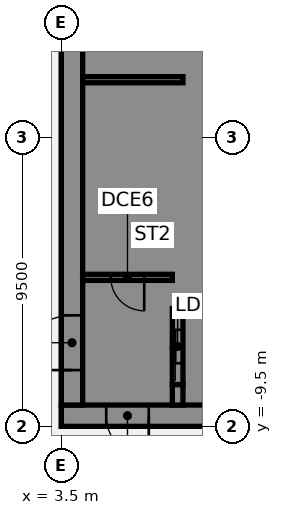
"""IFC4 building model, lengths in metres.
Left out: names, types, materials, properties, quantities, classifications, styles, units other than length and angle.
Written with IfcOpenShell. Run it as: python <this file> out.ifc"""

import sys

from ifc_helpers import new_model, si_unit, direction, frame, frame_2d, origin, place, context, subcontext, project, spatial, polyline, rectangle, outline, extrude, element, fill, save


model = new_model("IFC4")
c1 = context("Model", 3, precision=1e-05, world=origin(), true_north=direction((0.0, 1.0)))
c2 = subcontext(c1, "Body", "Model", "MODEL_VIEW")
j1 = project(units=[si_unit("LENGTHUNIT", "METRE"), si_unit("PLANEANGLEUNIT", "RADIAN")], contexts=[c1])
p1 = place(None, origin())
s1 = spatial("IfcSite", under=j1, at=p1, CompositionType="ELEMENT")
p2 = place(p1, origin())
s2 = spatial("IfcBuilding", under=s1, at=p2, CompositionType="ELEMENT")
p3 = place(p2, frame((0.0, 0.0, 71.5)))
s3 = spatial("IfcBuildingStorey", under=s2, at=p3, CompositionType="ELEMENT", Elevation=71.5)
p4 = place(p3, frame((16.5, -9.15, 0.0), z_axis=(0.0, 0.0, 1.0), x_axis=(-1.0, 0.0, 0.0)))
e1 = element("IfcWall", 1, at=p4, inside=s3, PredefinedType="SHEAR", context=c2, shape_type="SweptSolid", body=[
    extrude(rectangle(XDim=13.0, YDim=0.7, at=frame_2d((6.5, 0.0))), origin(), (0.0, 0.0, 1.0), 3.61),
])
p5 = place(p4, frame((4.15, 0.0, 0.0)))
e2 = element("IfcOpeningElement", 2, at=p5, cuts=e1, PredefinedType="OPENING", context=c2, shape_type="SweptSolid", body=[
    extrude(rectangle(XDim=1.4, YDim=2.1, at=frame_2d((0.7, 1.05))), frame((0.0, 0.36, 0.0), z_axis=(0.0, -1.0, 0.0), x_axis=(1.0, 0.0, 0.0)), (0.0, 0.0, 1.0), 0.72),
])
p6 = place(p4, frame((10.125, 0.0, 0.0)))
e3 = element("IfcOpeningElement", 3, at=p6, cuts=e1, PredefinedType="OPENING", context=c2, shape_type="SweptSolid", body=[
    extrude(rectangle(XDim=1.4, YDim=2.1, at=frame_2d((0.7, 1.05))), frame((0.0, 0.36, 0.0), z_axis=(0.0, -1.0, 0.0), x_axis=(1.0, 0.0, 0.0)), (0.0, 0.0, 1.0), 0.72),
])
p7 = place(p3, origin())
e4 = element("IfcWall", 4, at=p7, inside=s3, PredefinedType="SHEAR", context=c2, shape_type="SweptSolid", body=[
    extrude(outline(polyline([(9.8, -5.375), (7.5, -5.375), (7.5, -2.875), (9.8, -2.875), (9.8, -2.625), (7.5, -2.625), (7.5, -0.125), (9.8, -0.125), (9.8, 0.125), (7.5, 0.125), (7.5, 2.625), (9.8, 2.625), (9.8, 2.875), (7.5, 2.875), (7.5, 5.375), (9.8, 5.375), (9.8, 5.625), (7.5, 5.625), (7.5, 8.125), (9.8, 8.125), (9.8, 8.8), (7.5, 8.8), (7.15, 8.8), (7.15, -5.625), (7.5, -5.625), (9.8, -5.625), (9.8, -5.375)])), origin(), (0.0, 0.0, 1.0), 3.61),
])
p8 = place(p3, origin())
e5 = element("IfcWall", 5, at=p8, inside=s3, PredefinedType="SHEAR", context=c2, shape_type="SweptSolid", body=[
    extrude(outline(polyline([(7.5, -8.125), (7.5, -8.8), (9.8, -8.8), (9.8, -8.125), (9.8, -5.625), (9.55, -5.625), (9.55, -8.125), (7.5, -8.125)])), origin(), (0.0, 0.0, 1.0), 3.61),
])
p9 = place(p3, frame((7.325, -8.8, 0.0), z_axis=(0.0, 0.0, 1.0), x_axis=(0.0, 1.0, 0.0)))
e6 = element("IfcWall", 6, at=p9, inside=s3, PredefinedType="SHEAR", context=c2, shape_type="SweptSolid", body=[
    extrude(rectangle(XDim=0.675, YDim=0.35, at=frame_2d((0.337, 0.0))), origin(), (0.0, 0.0, 1.0), 3.61),
])
p10 = place(p3, frame((7.5, 1.9, 0.0), z_axis=(0.0, 0.0, 1.0), x_axis=(-1.0, 0.0, 0.0)))
e7 = element("IfcWall", 7, at=p10, inside=s3, PredefinedType="SHEAR", context=c2, shape_type="SweptSolid", body=[
    extrude(rectangle(XDim=3.3, YDim=0.2, at=frame_2d((1.65, 0.0))), origin(), (0.0, 0.0, 1.0), 3.61),
])
p11 = place(p3, frame((7.325, -8.125, 0.0), z_axis=(0.0, 0.0, 1.0), x_axis=(0.0, 1.0, 0.0)))
e8 = element("IfcWall", 8, at=p11, inside=s3, PredefinedType="SHEAR", context=c2, shape_type="SweptSolid", body=[
    extrude(rectangle(XDim=2.5, YDim=0.35, at=frame_2d((1.25, 0.0))), origin(), (0.0, 0.0, 1.0), 3.61),
])
p12 = place(p11, frame((0.7, 0.0, 0.0)))
e9 = element("IfcOpeningElement", 9, at=p12, cuts=e8, PredefinedType="OPENING", context=c2, shape_type="SweptSolid", body=[
    extrude(rectangle(XDim=1.1, YDim=2.1, at=frame_2d((0.55, 1.05))), frame((0.0, 0.185, 0.0), z_axis=(0.0, -1.0, 0.0), x_axis=(1.0, 0.0, 0.0)), (0.0, 0.0, 1.0), 0.37),
])
p13 = place(p3, frame((3.85, -8.8, 0.0), z_axis=(0.0, 0.0, 1.0), x_axis=(0.0, 1.0, 0.0)))
e10 = element("IfcWall", 10, at=p13, inside=s3, PredefinedType="SHEAR", context=c2, shape_type="SweptSolid", body=[
    extrude(rectangle(XDim=17.6, YDim=0.7, at=frame_2d((8.8, 0.0))), origin(), (0.0, 0.0, 1.0), 3.61),
])
p14 = place(p13, frame((1.15, 0.0, 0.0)))
e11 = element("IfcOpeningElement", 11, at=p14, cuts=e10, PredefinedType="OPENING", context=c2, shape_type="SweptSolid", body=[
    extrude(rectangle(XDim=1.8, YDim=2.1, at=frame_2d((0.9, 1.05))), frame((0.0, 0.36, 0.0), z_axis=(0.0, -1.0, 0.0), x_axis=(1.0, 0.0, 0.0)), (0.0, 0.0, 1.0), 0.72),
])
p15 = place(p13, frame((13.7, 0.0, 0.0)))
e12 = element("IfcOpeningElement", 12, at=p15, cuts=e10, PredefinedType="OPENING", context=c2, shape_type="SweptSolid", body=[
    extrude(rectangle(XDim=1.0, YDim=2.1, at=frame_2d((0.5, 1.05))), frame((0.0, 0.36, 0.0), z_axis=(0.0, -1.0, 0.0), x_axis=(1.0, 0.0, 0.0)), (0.0, 0.0, 1.0), 0.72),
])
p16 = place(p3, frame((7.15, -4.6, 0.0), z_axis=(0.0, 0.0, 1.0), x_axis=(-1.0, 0.0, 0.0)))
e13 = element("IfcWall", 13, at=p16, inside=s3, PredefinedType="SHEAR", context=c2, shape_type="SweptSolid", body=[
    extrude(rectangle(XDim=2.95, YDim=0.2, at=frame_2d((1.475, 0.0))), origin(), (0.0, 0.0, 1.0), 3.61),
])
p17 = place(p16, frame((0.925, 0.0, 0.0)))
e14 = element("IfcOpeningElement", 14, at=p17, cuts=e13, PredefinedType="OPENING", context=c2, shape_type="SweptSolid", body=[
    extrude(rectangle(XDim=1.1, YDim=2.1, at=frame_2d((0.55, 1.05))), frame((0.0, 0.11, 0.0), z_axis=(0.0, -1.0, 0.0), x_axis=(1.0, 0.0, 0.0)), (0.0, 0.0, 1.0), 0.22),
])
p18 = place(p6, origin())
e15 = element("IfcDoor", 15, at=p18, inside=s3, OperationType="SINGLE_SWING_LEFT", PredefinedType="DOOR", context=c2, shape_type="SweptSolid", body=[
    extrude(rectangle(XDim=1.4, YDim=2.1, at=frame_2d((0.7, 1.05))), frame((0.0, 0.025, 0.0), z_axis=(0.0, -1.0, 0.0), x_axis=(1.0, 0.0, 0.0)), (0.0, 0.0, 1.0), 0.05),
])
fill(e3, e15)
p19 = place(p14, origin())
e16 = element("IfcDoor", 16, at=p19, inside=s3, OperationType="SINGLE_SWING_LEFT", PredefinedType="DOOR", context=c2, shape_type="SweptSolid", body=[
    extrude(rectangle(XDim=1.8, YDim=2.1, at=frame_2d((0.9, 1.05))), frame((0.0, 0.025, 0.0), z_axis=(0.0, -1.0, 0.0), x_axis=(1.0, 0.0, 0.0)), (0.0, 0.0, 1.0), 0.05),
])
fill(e11, e16)
p20 = place(p17, origin())
e17 = element("IfcDoor", 17, at=p20, inside=s3, OperationType="SINGLE_SWING_LEFT", PredefinedType="DOOR", context=c2, shape_type="SweptSolid", body=[
    extrude(rectangle(XDim=1.1, YDim=2.1, at=frame_2d((0.55, 1.05))), frame((0.0, 0.025, 0.0), z_axis=(0.0, -1.0, 0.0), x_axis=(1.0, 0.0, 0.0)), (0.0, 0.0, 1.0), 0.05),
])
fill(e14, e17)
p21 = place(p12, origin())
e18 = element("IfcDoor", 18, at=p21, inside=s3, OperationType="SLIDING_TO_LEFT", PredefinedType="DOOR", context=c2, shape_type="SweptSolid", body=[
    extrude(rectangle(XDim=1.1, YDim=2.1, at=frame_2d((0.55, 1.05))), frame((0.0, 0.025, 0.0), z_axis=(0.0, -1.0, 0.0), x_axis=(1.0, 0.0, 0.0)), (0.0, 0.0, 1.0), 0.05),
])
fill(e9, e18)
save(model, sys.argv[1])
